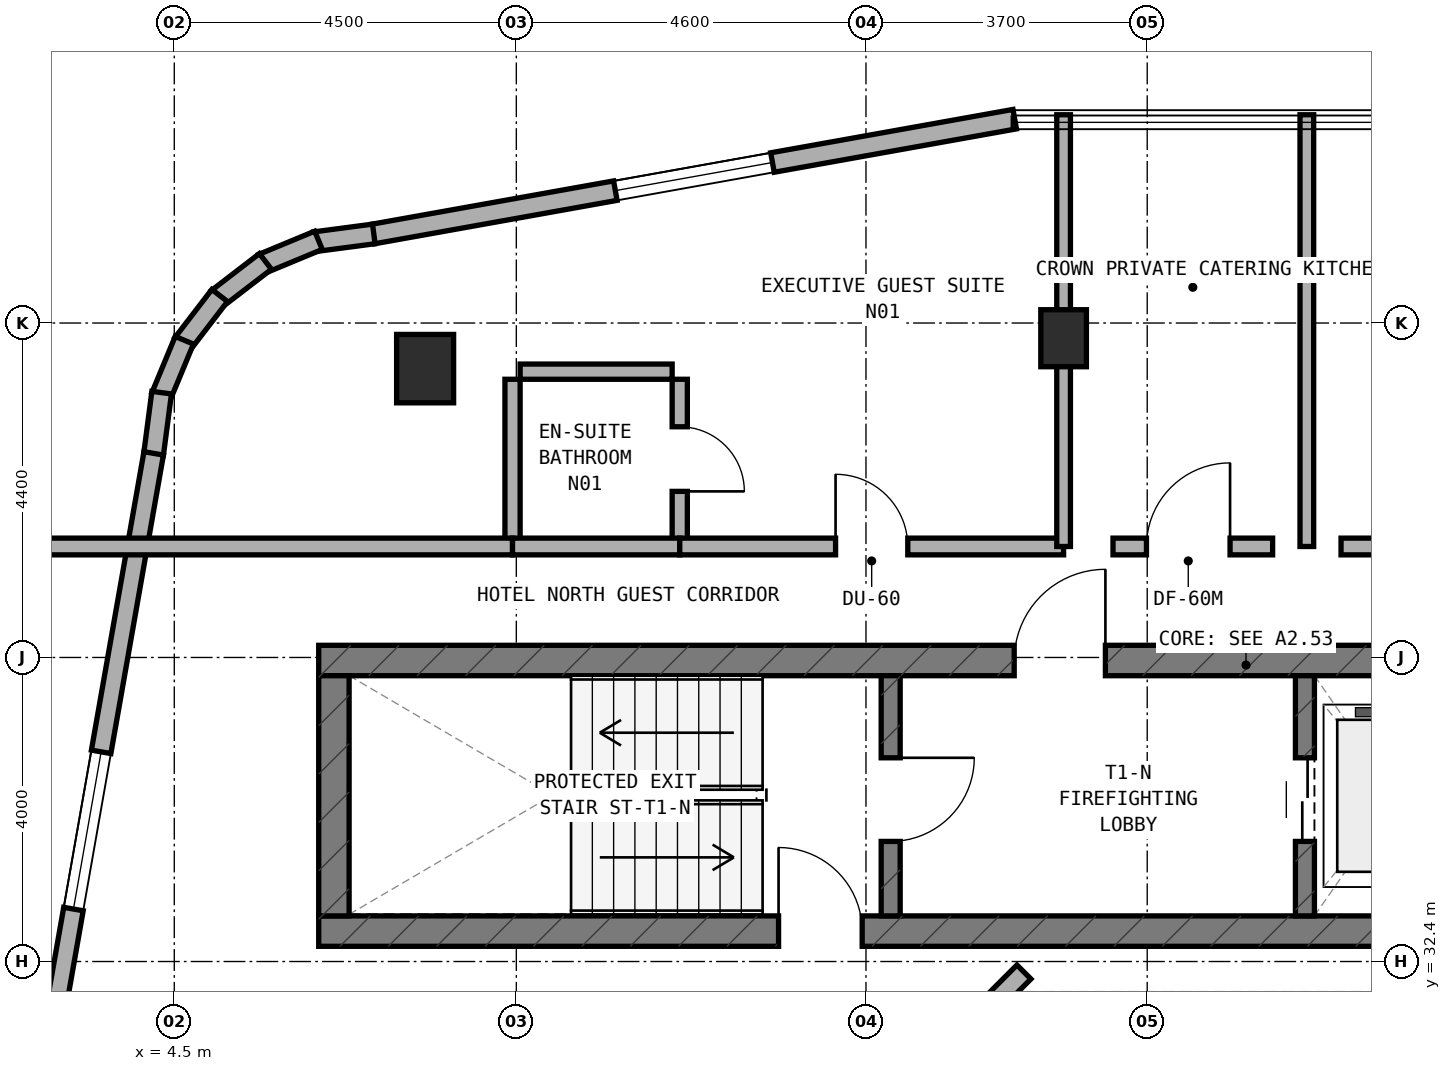
"""IFC4 building model, lengths in metres.
Left out: names, types, materials, properties, quantities, classifications, styles, units other than length and angle.
Written with IfcOpenShell. Run it as: python <this file> out.ifc"""

import sys

from ifc_helpers import new_model, si_unit, direction, frame, frame_2d, origin, origin_2d, place, context, subcontext, project, spatial, rectangle, extrude, element, fill, save


model = new_model("IFC4")
c1 = context("Model", 3, precision=1e-05, world=origin(), true_north=direction((0.0, 1.0)))
c2 = subcontext(c1, "Body", "Model", "MODEL_VIEW")
j1 = project(units=[si_unit("LENGTHUNIT", "METRE"), si_unit("PLANEANGLEUNIT", "RADIAN")], contexts=[c1])
p1 = place(None, origin())
s1 = spatial("IfcSite", under=j1, at=p1, CompositionType="ELEMENT")
p2 = place(p1, origin())
s2 = spatial("IfcBuilding", under=s1, at=p2, CompositionType="ELEMENT")
p3 = place(p2, frame((0.0, 0.0, 246.8)))
s3 = spatial("IfcBuildingStorey", under=s2, at=p3, CompositionType="ELEMENT", Elevation=246.8)
p4 = place(p3, frame((6.4, 32.8, 0.0), z_axis=(0.0, 0.0, 1.0), x_axis=(1.0, 0.0, 0.0)))
e1 = element("IfcWall", 1, at=p4, inside=s3, PredefinedType="SHEAR", context=c2, shape_type="SweptSolid", body=[
    extrude(rectangle(XDim=24.4, YDim=0.4, at=frame_2d((12.2, 0.0))), origin(), (0.0, 0.0, 1.0), 3.6),
])
p5 = place(p4, frame((6.05, 0.0, 0.0)))
e2 = element("IfcOpeningElement", 2, at=p5, cuts=e1, PredefinedType="OPENING", context=c2, shape_type="SweptSolid", body=[
    extrude(rectangle(XDim=1.1, YDim=2.15, at=frame_2d((0.55, 1.075))), frame((0.0, 0.21, 0.0), z_axis=(0.0, -1.0, 0.0), x_axis=(1.0, 0.0, 0.0)), (0.0, 0.0, 1.0), 0.42),
])
p6 = place(p3, frame((6.4, 36.36, 0.0), z_axis=(0.0, 0.0, 1.0), x_axis=(1.0, 0.0, 0.0)))
e3 = element("IfcWall", 3, at=p6, inside=s3, PredefinedType="SHEAR", context=c2, shape_type="SweptSolid", body=[
    extrude(rectangle(XDim=24.4, YDim=0.4, at=frame_2d((12.2, 0.0))), origin(), (0.0, 0.0, 1.0), 3.6),
])
p7 = place(p6, frame((9.15, 0.0, 0.0)))
e4 = element("IfcOpeningElement", 4, at=p7, cuts=e3, PredefinedType="OPENING", context=c2, shape_type="SweptSolid", body=[
    extrude(rectangle(XDim=1.2, YDim=2.15, at=frame_2d((0.6, 1.075))), frame((0.0, 0.21, 0.0), z_axis=(0.0, -1.0, 0.0), x_axis=(1.0, 0.0, 0.0)), (0.0, 0.0, 1.0), 0.42),
])
p8 = place(p6, frame((19.2, 0.0, 0.0)))
e5 = element("IfcOpeningElement", 5, at=p8, cuts=e3, PredefinedType="OPENING", context=c2, shape_type="SweptSolid", body=[
    extrude(rectangle(XDim=0.85, YDim=2.1, at=frame_2d((0.425, 1.05))), frame((0.0, 0.21, 0.0), z_axis=(0.0, -1.0, 0.0), x_axis=(1.0, 0.0, 0.0)), (0.0, 0.0, 1.0), 0.42),
])
p9 = place(p6, frame((17.22, 0.0, 0.0)))
e6 = element("IfcOpeningElement", 6, at=p9, cuts=e3, PredefinedType="OPENING", context=c2, shape_type="SweptSolid", body=[
    extrude(rectangle(XDim=0.85, YDim=2.1, at=frame_2d((0.425, 1.05))), frame((0.0, 0.21, 0.0), z_axis=(0.0, -1.0, 0.0), x_axis=(1.0, 0.0, 0.0)), (0.0, 0.0, 1.0), 0.42),
])
p10 = place(p3, frame((6.6, 33.0, 0.0), z_axis=(0.0, 0.0, 1.0), x_axis=(0.0, 1.0, 0.0)))
e7 = element("IfcWall", 7, at=p10, inside=s3, PredefinedType="SHEAR", context=c2, shape_type="SweptSolid", body=[
    extrude(rectangle(XDim=3.16, YDim=0.4, at=frame_2d((1.58, 0.0))), origin(), (0.0, 0.0, 1.0), 3.6),
])
p11 = place(p3, frame((13.925, 33.0, 0.0), z_axis=(0.0, 0.0, 1.0), x_axis=(0.0, 1.0, 0.0)))
e8 = element("IfcWall", 8, at=p11, inside=s3, PredefinedType="STANDARD", context=c2, shape_type="SweptSolid", body=[
    extrude(rectangle(XDim=3.16, YDim=0.25, at=frame_2d((1.58, 0.0))), origin(), (0.0, 0.0, 1.0), 3.32),
])
p12 = place(p11, frame((0.98, 0.0, 0.0)))
e9 = element("IfcOpeningElement", 9, at=p12, cuts=e8, PredefinedType="OPENING", context=c2, shape_type="SweptSolid", body=[
    extrude(rectangle(XDim=1.1, YDim=2.15, at=frame_2d((0.55, 1.075))), frame((0.0, 0.135, 0.0), z_axis=(0.0, -1.0, 0.0), x_axis=(1.0, 0.0, 0.0)), (0.0, 0.0, 1.0), 0.27),
])
p13 = place(p3, frame((19.375, 33.0, 0.0), z_axis=(0.0, 0.0, 1.0), x_axis=(0.0, 1.0, 0.0)))
e10 = element("IfcWall", 10, at=p13, inside=s3, PredefinedType="STANDARD", context=c2, shape_type="SweptSolid", body=[
    extrude(rectangle(XDim=3.16, YDim=0.25, at=frame_2d((1.58, 0.0))), origin(), (0.0, 0.0, 1.0), 3.32),
])
p14 = place(p13, frame((0.98, 0.0, 0.0)))
e11 = element("IfcOpeningElement", 11, at=p14, cuts=e10, PredefinedType="OPENING", context=c2, shape_type="SweptSolid", body=[
    extrude(rectangle(XDim=1.1, YDim=2.15, at=frame_2d((0.55, 1.075))), frame((0.0, 0.135, 0.0), z_axis=(0.0, -1.0, 0.0), x_axis=(1.0, 0.0, 0.0)), (0.0, 0.0, 1.0), 0.27),
])
p15 = place(p3, frame((16.2, 40.6, 0.0), z_axis=(0.0, 0.0, 1.0), x_axis=(1.0, 0.0, 0.0)))
e12 = element("IfcColumn", 12, at=p15, inside=s3, PredefinedType="COLUMN", context=c2, shape_type="SweptSolid", body=[
    extrude(rectangle(XDim=0.6, YDim=0.75, at=origin_2d()), origin(), (0.0, 0.0, 1.0), 3.6),
])
p16 = place(p3, frame((7.8, 40.2, 0.0), z_axis=(0.0, 0.0, 1.0), x_axis=(1.0, 0.0, 0.0)))
e13 = element("IfcColumn", 13, at=p16, inside=s3, PredefinedType="COLUMN", context=c2, shape_type="SweptSolid", body=[
    extrude(rectangle(XDim=0.75, YDim=0.9, at=origin_2d()), origin(), (0.0, 0.0, 1.0), 3.6),
])
p17 = place(p3, frame((15.557, 43.482, 0.0), z_axis=(0.0, 0.0, 1.0), x_axis=(-0.98435676639, -0.176186709098, 0.0)))
e14 = element("IfcWall", 14, at=p17, inside=s3, PredefinedType="STANDARD", context=c2, shape_type="SweptSolid", body=[
    extrude(rectangle(XDim=8.576, YDim=0.26, at=frame_2d((4.288, 0.0))), origin(), (0.0, 0.0, 1.0), 3.32),
])
p18 = place(p17, frame((3.238, 0.0, 0.85)))
e15 = element("IfcOpeningElement", 15, at=p18, cuts=e14, PredefinedType="OPENING", context=c2, shape_type="SweptSolid", body=[
    extrude(rectangle(XDim=2.1, YDim=1.5, at=frame_2d((1.05, 0.75))), frame((0.0, 0.14, 0.0), z_axis=(0.0, -1.0, 0.0), x_axis=(1.0, 0.0, 0.0)), (0.0, 0.0, 1.0), 0.28),
])
p19 = place(p3, frame((7.125, 41.972, 0.0), z_axis=(0.0, 0.0, 1.0), x_axis=(-0.991458553189, -0.130422150372, 0.0)))
e16 = element("IfcWall", 16, at=p19, inside=s3, PredefinedType="STANDARD", context=c2, shape_type="SweptSolid", body=[
    extrude(rectangle(XDim=0.781, YDim=0.26, at=frame_2d((0.39, 0.0))), origin(), (0.0, 0.0, 1.0), 3.32),
])
p20 = place(p3, frame((6.397, 41.888, 0.0), z_axis=(0.0, 0.0, 1.0), x_axis=(-0.923789573295, -0.382900540965, 0.0)))
e17 = element("IfcWall", 17, at=p20, inside=s3, PredefinedType="STANDARD", context=c2, shape_type="SweptSolid", body=[
    extrude(rectangle(XDim=0.799, YDim=0.26, at=frame_2d((0.399, 0.0))), origin(), (0.0, 0.0, 1.0), 3.32),
])
for number, where, z_axis, x_axis in (
    (18, (5.699, 41.61, 0.0), (0.0, 0.0, 1.0), (-0.793, -0.609, 0.0)),
    (19, (5.097, 41.162, 0.0), (0.0, 0.0, 1.0), (-0.609, -0.793, 0.0)),
):
    element("IfcWall", number, at=place(p3, frame(where, z_axis=z_axis, x_axis=x_axis)), inside=s3, PredefinedType="STANDARD", context=c2, shape_type="SweptSolid", body=[
        extrude(rectangle(XDim=0.798, YDim=0.26, at=frame_2d((0.399, 0.0))), origin(), (0.0, 0.0, 1.0), 3.32),
    ])
p21 = place(p3, frame((4.632, 40.573, 0.0), z_axis=(0.0, 0.0, 1.0), x_axis=(-0.383161279238, -0.923681457047, 0.0)))
e20 = element("IfcWall", 20, at=p21, inside=s3, PredefinedType="STANDARD", context=c2, shape_type="SweptSolid", body=[
    extrude(rectangle(XDim=0.799, YDim=0.26, at=frame_2d((0.399, 0.0))), origin(), (0.0, 0.0, 1.0), 3.32),
])
p22 = place(p3, frame((4.334, 39.884, 0.0), z_axis=(0.0, 0.0, 1.0), x_axis=(-0.129850802102, -0.99153354416, 0.0)))
e21 = element("IfcWall", 21, at=p22, inside=s3, PredefinedType="STANDARD", context=c2, shape_type="SweptSolid", body=[
    extrude(rectangle(XDim=0.816, YDim=0.26, at=frame_2d((0.408, 0.0))), origin(), (0.0, 0.0, 1.0), 3.32),
])
p23 = place(p3, frame((4.229, 39.085, 0.0), z_axis=(0.0, 0.0, 1.0), x_axis=(-0.173396937698, -0.984852020355, 0.0)))
e22 = element("IfcWall", 22, at=p23, inside=s3, PredefinedType="STANDARD", context=c2, shape_type="SweptSolid", body=[
    extrude(rectangle(XDim=8.714, YDim=0.26, at=frame_2d((4.357, 0.0))), origin(), (0.0, 0.0, 1.0), 3.32),
])
p24 = place(p23, frame((3.987, 0.0, 0.85)))
e23 = element("IfcOpeningElement", 23, at=p24, cuts=e22, PredefinedType="OPENING", context=c2, shape_type="SweptSolid", body=[
    extrude(rectangle(XDim=2.1, YDim=1.5, at=frame_2d((1.05, 0.75))), frame((0.0, 0.14, 0.0), z_axis=(0.0, -1.0, 0.0), x_axis=(1.0, 0.0, 0.0)), (0.0, 0.0, 1.0), 0.28),
])
p25 = place(p3, frame((15.678, 32.262, 0.0), z_axis=(0.0, 0.0, 1.0), x_axis=(-0.707106781187, -0.707106781187, 0.0)))
e24 = element("IfcWall", 24, at=p25, inside=s3, PredefinedType="STANDARD", context=c2, shape_type="SweptSolid", body=[
    extrude(rectangle(XDim=2.594, YDim=0.26, at=frame_2d((1.297, 0.0))), origin(), (0.0, 0.0, 1.0), 3.32),
])
p26 = place(p3, frame((11.15, 37.96, 0.0), z_axis=(0.0, 0.0, 1.0), x_axis=(0.0, 1.0, 0.0)))
e25 = element("IfcWall", 25, at=p26, inside=s3, PredefinedType="PLUMBINGWALL", context=c2, shape_type="SweptSolid", body=[
    extrude(rectangle(XDim=2.1, YDim=0.2, at=frame_2d((1.05, 0.0))), origin(), (0.0, 0.0, 1.0), 3.025),
])
p27 = place(p26, frame((0.625, 0.0, 0.0)))
e26 = element("IfcOpeningElement", 26, at=p27, cuts=e25, PredefinedType="OPENING", context=c2, shape_type="SweptSolid", body=[
    extrude(rectangle(XDim=0.85, YDim=2.1, at=frame_2d((0.425, 1.05))), frame((0.0, 0.11, 0.0), z_axis=(0.0, -1.0, 0.0), x_axis=(1.0, 0.0, 0.0)), (0.0, 0.0, 1.0), 0.22),
])
p28 = place(p3, frame((9.05, 40.16, 0.0), z_axis=(0.0, 0.0, 1.0), x_axis=(1.0, 0.0, 0.0)))
e27 = element("IfcWall", 27, at=p28, inside=s3, PredefinedType="PLUMBINGWALL", context=c2, shape_type="SweptSolid", body=[
    extrude(rectangle(XDim=2.0, YDim=0.2, at=frame_2d((1.0, 0.0))), origin(), (0.0, 0.0, 1.0), 3.015),
])
p29 = place(p3, frame((8.95, 37.96, 0.0), z_axis=(0.0, 0.0, 1.0), x_axis=(0.0, 1.0, 0.0)))
e28 = element("IfcWall", 28, at=p29, inside=s3, PredefinedType="PLUMBINGWALL", context=c2, shape_type="SweptSolid", body=[
    extrude(rectangle(XDim=2.1, YDim=0.2, at=frame_2d((1.05, 0.0))), origin(), (0.0, 0.0, 1.0), 3.025),
])
p30 = place(p3, frame((2.76, 37.86, 0.0), z_axis=(0.0, 0.0, 1.0), x_axis=(1.0, 0.0, 0.0)))
e29 = element("IfcWall", 29, at=p30, inside=s3, PredefinedType="SOLIDWALL", context=c2, shape_type="SweptSolid", body=[
    extrude(rectangle(XDim=6.19, YDim=0.22, at=frame_2d((3.095, 0.0))), origin(), (0.0, 0.0, 1.0), 2.745),
])
p31 = place(p3, frame((8.95, 37.86, 0.0), z_axis=(0.0, 0.0, 1.0), x_axis=(1.0, 0.0, 0.0)))
e30 = element("IfcWall", 30, at=p31, inside=s3, PredefinedType="SOLIDWALL", context=c2, shape_type="SweptSolid", body=[
    extrude(rectangle(XDim=2.2, YDim=0.22, at=frame_2d((1.1, 0.0))), origin(), (0.0, 0.0, 1.0), 3.32),
])
p32 = place(p3, frame((11.15, 37.86, 0.0), z_axis=(0.0, 0.0, 1.0), x_axis=(1.0, 0.0, 0.0)))
e31 = element("IfcWall", 31, at=p32, inside=s3, PredefinedType="SOLIDWALL", context=c2, shape_type="SweptSolid", body=[
    extrude(rectangle(XDim=5.05, YDim=0.22, at=frame_2d((2.525, 0.0))), origin(), (0.0, 0.0, 1.0), 2.745),
])
p33 = place(p32, frame((2.05, 0.0, 0.0)))
e32 = element("IfcOpeningElement", 32, at=p33, cuts=e31, PredefinedType="OPENING", context=c2, shape_type="SweptSolid", body=[
    extrude(rectangle(XDim=0.95, YDim=2.1, at=frame_2d((0.475, 1.05))), frame((0.0, 0.12, 0.0), z_axis=(0.0, -1.0, 0.0), x_axis=(1.0, 0.0, 0.0)), (0.0, 0.0, 1.0), 0.24),
])
p34 = place(p3, frame((16.2, 37.86, 0.0), z_axis=(0.0, 0.0, 1.0), x_axis=(0.0, 1.0, 0.0)))
e33 = element("IfcWall", 33, at=p34, inside=s3, PredefinedType="SOLIDWALL", context=c2, shape_type="SweptSolid", body=[
    extrude(rectangle(XDim=5.68, YDim=0.18, at=frame_2d((2.84, 0.0))), origin(), (0.0, 0.0, 1.0), 2.745),
])
p35 = place(p3, frame((19.4, 37.86, 0.0), z_axis=(0.0, 0.0, 1.0), x_axis=(0.0, 1.0, 0.0)))
e34 = element("IfcWall", 34, at=p35, inside=s3, PredefinedType="SOLIDWALL", context=c2, shape_type="SweptSolid", body=[
    extrude(rectangle(XDim=5.68, YDim=0.18, at=frame_2d((2.84, 0.0))), origin(), (0.0, 0.0, 1.0), 3.015),
])
p36 = place(p3, frame((16.85, 37.86, 0.0), z_axis=(0.0, 0.0, 1.0), x_axis=(1.0, 0.0, 0.0)))
e35 = element("IfcWall", 35, at=p36, inside=s3, PredefinedType="SOLIDWALL", context=c2, shape_type="SweptSolid", body=[
    extrude(rectangle(XDim=2.1, YDim=0.22, at=frame_2d((1.05, 0.0))), origin(), (0.0, 0.0, 1.0), 3.32),
])
p37 = place(p36, frame((0.44, 0.0, 0.0)))
e36 = element("IfcOpeningElement", 36, at=p37, cuts=e35, PredefinedType="OPENING", context=c2, shape_type="SweptSolid", body=[
    extrude(rectangle(XDim=1.1, YDim=2.1, at=frame_2d((0.55, 1.05))), frame((0.0, 0.12, 0.0), z_axis=(0.0, -1.0, 0.0), x_axis=(1.0, 0.0, 0.0)), (0.0, 0.0, 1.0), 0.24),
])
p38 = place(p3, frame((19.85, 37.86, 0.0), z_axis=(0.0, 0.0, 1.0), x_axis=(1.0, 0.0, 0.0)))
e37 = element("IfcWall", 37, at=p38, inside=s3, PredefinedType="SOLIDWALL", context=c2, shape_type="SweptSolid", body=[
    extrude(rectangle(XDim=5.3, YDim=0.22, at=frame_2d((2.65, 0.0))), origin(), (0.0, 0.0, 1.0), 3.32),
])
p39 = place(p38, frame((1.88, 0.0, 0.0)))
e38 = element("IfcOpeningElement", 38, at=p39, cuts=e37, PredefinedType="OPENING", context=c2, shape_type="SweptSolid", body=[
    extrude(rectangle(XDim=1.1, YDim=2.1, at=frame_2d((0.55, 1.05))), frame((0.0, 0.12, 0.0), z_axis=(0.0, -1.0, 0.0), x_axis=(1.0, 0.0, 0.0)), (0.0, 0.0, 1.0), 0.24),
])
p40 = place(p18, origin())
e39 = element("IfcWindow", 39, at=p40, inside=s3, PartitioningType="SINGLE_PANEL", PredefinedType="WINDOW", context=c2, shape_type="SweptSolid", body=[
    extrude(rectangle(XDim=2.1, YDim=1.5, at=frame_2d((1.05, 0.75))), frame((0.0, 0.03, 0.0), z_axis=(0.0, -1.0, 0.0), x_axis=(1.0, 0.0, 0.0)), (0.0, 0.0, 1.0), 0.06),
])
fill(e15, e39)
p41 = place(p24, origin())
e40 = element("IfcWindow", 40, at=p41, inside=s3, PartitioningType="SINGLE_PANEL", PredefinedType="WINDOW", context=c2, shape_type="SweptSolid", body=[
    extrude(rectangle(XDim=2.1, YDim=1.5, at=frame_2d((1.05, 0.75))), frame((0.0, 0.03, 0.0), z_axis=(0.0, -1.0, 0.0), x_axis=(1.0, 0.0, 0.0)), (0.0, 0.0, 1.0), 0.06),
])
fill(e23, e40)
p42 = place(p12, frame((1.1, 0.0, 0.0), z_axis=(0.0, 0.0, 1.0), x_axis=(-1.0, 0.0, 0.0)))
e41 = element("IfcDoor", 41, at=p42, inside=s3, OperationType="SINGLE_SWING_LEFT", PredefinedType="DOOR", context=c2, shape_type="SweptSolid", body=[
    extrude(rectangle(XDim=1.1, YDim=2.15, at=frame_2d((0.55, 1.075))), frame((0.0, 0.025, 0.0), z_axis=(0.0, -1.0, 0.0), x_axis=(1.0, 0.0, 0.0)), (0.0, 0.0, 1.0), 0.05),
])
fill(e9, e41)
p43 = place(p7, origin())
e42 = element("IfcDoor", 42, at=p43, inside=s3, OperationType="SINGLE_SWING_RIGHT", PredefinedType="DOOR", context=c2, shape_type="SweptSolid", body=[
    extrude(rectangle(XDim=1.2, YDim=2.15, at=frame_2d((0.6, 1.075))), frame((0.0, 0.025, 0.0), z_axis=(0.0, -1.0, 0.0), x_axis=(1.0, 0.0, 0.0)), (0.0, 0.0, 1.0), 0.05),
])
fill(e4, e42)
p44 = place(p14, origin())
e43 = element("IfcDoor", 43, at=p44, inside=s3, OperationType="DOUBLE_DOOR_SLIDING", PredefinedType="DOOR", context=c2, shape_type="SweptSolid", body=[
    extrude(rectangle(XDim=1.1, YDim=2.15, at=frame_2d((0.55, 1.075))), frame((0.0, 0.025, 0.0), z_axis=(0.0, -1.0, 0.0), x_axis=(1.0, 0.0, 0.0)), (0.0, 0.0, 1.0), 0.05),
])
fill(e11, e43)
p45 = place(p5, origin())
e44 = element("IfcDoor", 44, at=p45, inside=s3, OperationType="SINGLE_SWING_LEFT", PredefinedType="DOOR", context=c2, shape_type="SweptSolid", body=[
    extrude(rectangle(XDim=1.1, YDim=2.15, at=frame_2d((0.55, 1.075))), frame((0.0, 0.025, 0.0), z_axis=(0.0, -1.0, 0.0), x_axis=(1.0, 0.0, 0.0)), (0.0, 0.0, 1.0), 0.05),
])
fill(e2, e44)
p46 = place(p27, frame((0.85, 0.0, 0.0), z_axis=(0.0, 0.0, 1.0), x_axis=(-1.0, 0.0, 0.0)))
e45 = element("IfcDoor", 45, at=p46, inside=s3, OperationType="SINGLE_SWING_RIGHT", PredefinedType="DOOR", context=c2, shape_type="SweptSolid", body=[
    extrude(rectangle(XDim=0.85, YDim=2.1, at=frame_2d((0.425, 1.05))), frame((0.0, 0.025, 0.0), z_axis=(0.0, -1.0, 0.0), x_axis=(1.0, 0.0, 0.0)), (0.0, 0.0, 1.0), 0.05),
])
fill(e26, e45)
p47 = place(p33, origin())
e46 = element("IfcDoor", 46, at=p47, inside=s3, OperationType="SINGLE_SWING_LEFT", PredefinedType="DOOR", context=c2, shape_type="SweptSolid", body=[
    extrude(rectangle(XDim=0.95, YDim=2.1, at=frame_2d((0.475, 1.05))), frame((0.0, 0.025, 0.0), z_axis=(0.0, -1.0, 0.0), x_axis=(1.0, 0.0, 0.0)), (0.0, 0.0, 1.0), 0.05),
])
fill(e32, e46)
p48 = place(p37, origin())
e47 = element("IfcDoor", 47, at=p48, inside=s3, OperationType="SINGLE_SWING_RIGHT", PredefinedType="DOOR", context=c2, shape_type="SweptSolid", body=[
    extrude(rectangle(XDim=1.1, YDim=2.1, at=frame_2d((0.55, 1.05))), frame((0.0, 0.025, 0.0), z_axis=(0.0, -1.0, 0.0), x_axis=(1.0, 0.0, 0.0)), (0.0, 0.0, 1.0), 0.05),
])
fill(e36, e47)
save(model, sys.argv[1])
